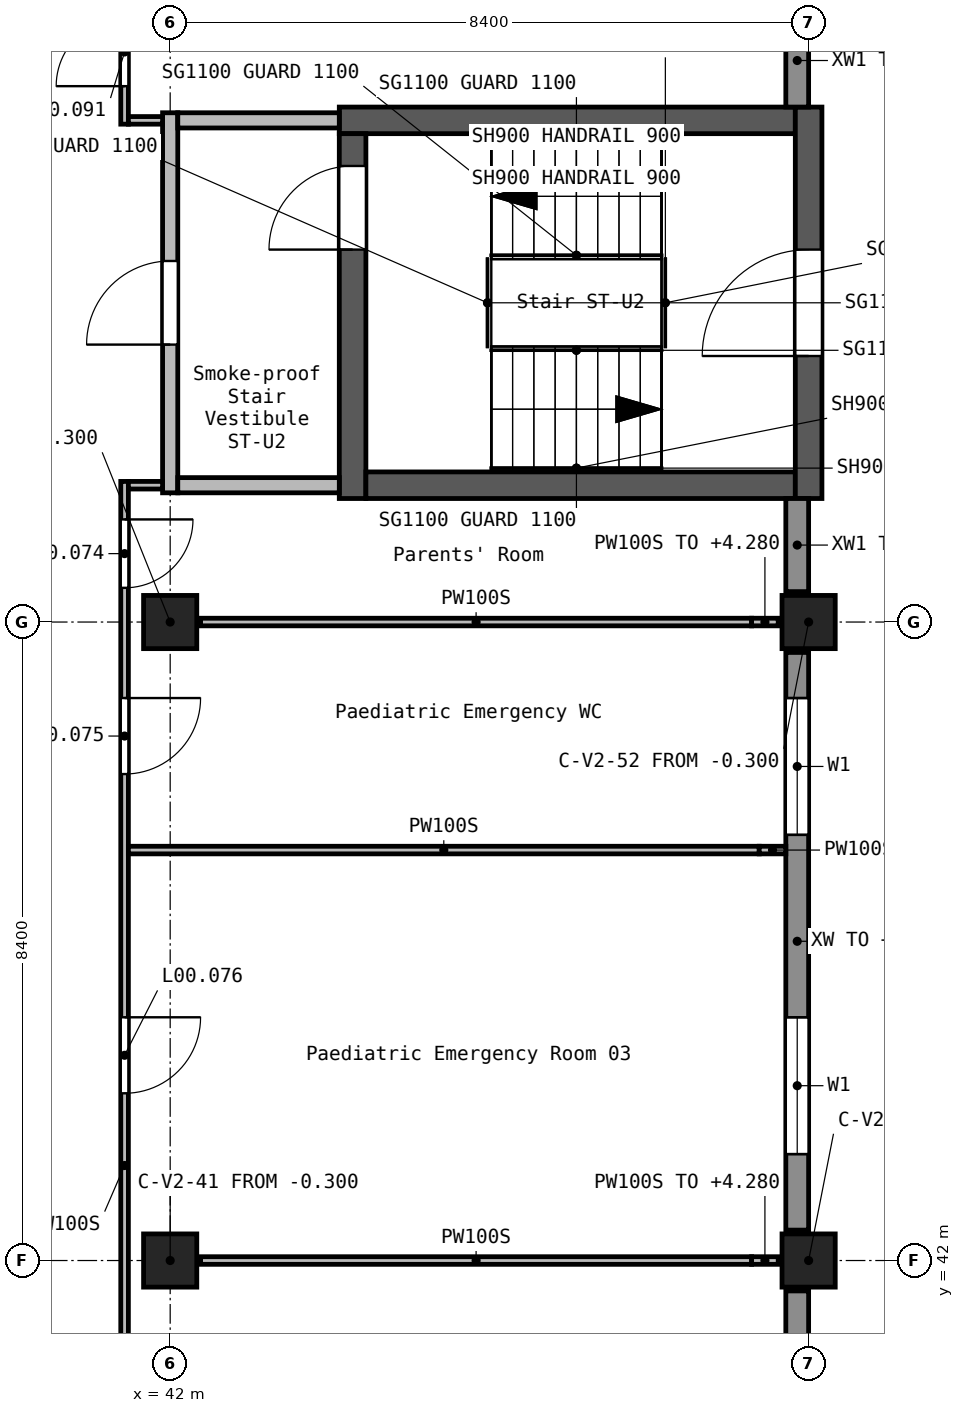
"""IFC4 building model, lengths in metres.
Left out: names, types, materials, properties, quantities, classifications, styles, units other than length and angle.
Written with IfcOpenShell. Run it as: python <this file> out.ifc"""

import sys

from ifc_helpers import new_model, si_unit, direction, frame, frame_2d, origin, origin_2d, place, context, subcontext, project, spatial, rectangle, extrude, element, fill, save


model = new_model("IFC4")
c1 = context("Model", 3, precision=1e-05, world=origin(), true_north=direction((0.0, 1.0)))
c2 = subcontext(c1, "Body", "Model", "MODEL_VIEW")
j1 = project(units=[si_unit("LENGTHUNIT", "METRE"), si_unit("PLANEANGLEUNIT", "RADIAN")], contexts=[c1])
p1 = place(None, origin())
s1 = spatial("IfcSite", under=j1, at=p1, CompositionType="ELEMENT")
p2 = place(p1, origin())
s2 = spatial("IfcBuilding", under=s1, at=p2, CompositionType="ELEMENT")
p3 = place(p2, origin())
s3 = spatial("IfcBuildingStorey", under=s2, at=p3, CompositionType="ELEMENT", Elevation=0.0)
for number, where, z_axis, x_axis in (
    (1, (42.0, 42.0, -0.3), (0.0, 0.0, 1.0), (1.0, 0.0, 0.0)),
    (2, (42.0, 50.4, -0.3), (0.0, 0.0, 1.0), (1.0, 0.0, 0.0)),
    (3, (50.4, 42.0, -0.3), (0.0, 0.0, 1.0), (1.0, 0.0, 0.0)),
    (4, (50.4, 50.4, -0.3), (0.0, 0.0, 1.0), (1.0, 0.0, 0.0)),
):
    element("IfcColumn", number, at=place(p3, frame(where, z_axis=z_axis, x_axis=x_axis)), inside=s3, PredefinedType="COLUMN", context=c2, shape_type="SweptSolid", body=[
        extrude(rectangle(XDim=0.7, YDim=0.7, at=origin_2d()), origin(), (0.0, 0.0, 1.0), 5.7),
    ])
p4 = place(p3, frame((44.225, 57.0, -0.3), z_axis=(0.0, 0.0, 1.0), x_axis=(1.0, 0.0, 0.0)))
e5 = element("IfcWall", 5, at=p4, inside=s3, PredefinedType="SHEAR", context=c2, shape_type="SweptSolid", body=[
    extrude(rectangle(XDim=6.0, YDim=0.35, at=frame_2d((3.0, 0.0))), origin(), (0.0, 0.0, 1.0), 5.7),
])
p5 = place(p3, frame((44.4, 52.025, -0.3), z_axis=(0.0, 0.0, 1.0), x_axis=(0.0, 1.0, 0.0)))
e6 = element("IfcWall", 6, at=p5, inside=s3, PredefinedType="SHEAR", context=c2, shape_type="SweptSolid", body=[
    extrude(rectangle(XDim=4.8, YDim=0.35, at=frame_2d((2.4, 0.0))), origin(), (0.0, 0.0, 1.0), 5.7),
])
p6 = place(p5, frame((3.275, 0.0, 0.3)))
e7 = element("IfcOpeningElement", 7, at=p6, cuts=e6, PredefinedType="OPENING", context=c2, shape_type="SweptSolid", body=[
    extrude(rectangle(XDim=1.1, YDim=2.1, at=frame_2d((0.55, 1.05))), frame((0.0, 0.185, 0.0), z_axis=(0.0, -1.0, 0.0), x_axis=(1.0, 0.0, 0.0)), (0.0, 0.0, 1.0), 0.37),
])
p7 = place(p3, frame((44.575, 52.2, -0.3), z_axis=(0.0, 0.0, 1.0), x_axis=(1.0, 0.0, 0.0)))
e8 = element("IfcWall", 8, at=p7, inside=s3, PredefinedType="SHEAR", context=c2, shape_type="SweptSolid", body=[
    extrude(rectangle(XDim=5.65, YDim=0.35, at=frame_2d((2.825, 0.0))), origin(), (0.0, 0.0, 1.0), 5.7),
])
p8 = place(p3, frame((50.4, 52.025, -0.3), z_axis=(0.0, 0.0, 1.0), x_axis=(0.0, 1.0, 0.0)))
e9 = element("IfcWall", 9, at=p8, inside=s3, PredefinedType="SHEAR", context=c2, shape_type="SweptSolid", body=[
    extrude(rectangle(XDim=5.15, YDim=0.35, at=frame_2d((2.575, 0.0))), origin(), (0.0, 0.0, 1.0), 5.7),
])
p9 = place(p8, frame((1.875, 0.0, 0.3)))
e10 = element("IfcOpeningElement", 10, at=p9, cuts=e9, PredefinedType="OPENING", context=c2, shape_type="SweptSolid", body=[
    extrude(rectangle(XDim=1.4, YDim=2.1, at=frame_2d((0.7, 1.05))), frame((0.0, 0.185, 0.0), z_axis=(0.0, -1.0, 0.0), x_axis=(1.0, 0.0, 0.0)), (0.0, 0.0, 1.0), 0.37),
])
p10 = place(p3, frame((50.25, 34.0, 0.0), z_axis=(0.0, 0.0, 1.0), x_axis=(0.0, 1.0, 0.0)))
e11 = element("IfcWall", 11, at=p10, inside=s3, PredefinedType="STANDARD", context=c2, shape_type="SweptSolid", body=[
    extrude(rectangle(XDim=7.6, YDim=0.3, at=frame_2d((3.8, 0.0))), origin(), (0.0, 0.0, 1.0), 4.25),
])
p11 = place(p10, frame((1.0, 0.0, 0.9)))
e12 = element("IfcOpeningElement", 12, at=p11, cuts=e11, PredefinedType="OPENING", context=c2, shape_type="SweptSolid", body=[
    extrude(rectangle(XDim=1.8, YDim=1.5, at=frame_2d((0.9, 0.75))), frame((0.0, 0.16, 0.0), z_axis=(0.0, -1.0, 0.0), x_axis=(1.0, 0.0, 0.0)), (0.0, 0.0, 1.0), 0.32),
])
p12 = place(p10, frame((4.8, 0.0, 0.9)))
e13 = element("IfcOpeningElement", 13, at=p12, cuts=e11, PredefinedType="OPENING", context=c2, shape_type="SweptSolid", body=[
    extrude(rectangle(XDim=1.8, YDim=1.5, at=frame_2d((0.9, 0.75))), frame((0.0, 0.16, 0.0), z_axis=(0.0, -1.0, 0.0), x_axis=(1.0, 0.0, 0.0)), (0.0, 0.0, 1.0), 0.32),
])
p13 = place(p3, frame((50.25, 42.4, 0.0), z_axis=(0.0, 0.0, 1.0), x_axis=(0.0, 1.0, 0.0)))
e14 = element("IfcWall", 14, at=p13, inside=s3, PredefinedType="STANDARD", context=c2, shape_type="SweptSolid", body=[
    extrude(rectangle(XDim=7.6, YDim=0.3, at=frame_2d((3.8, 0.0))), origin(), (0.0, 0.0, 1.0), 4.25),
])
p14 = place(p13, frame((1.0, 0.0, 0.9)))
e15 = element("IfcOpeningElement", 15, at=p14, cuts=e14, PredefinedType="OPENING", context=c2, shape_type="SweptSolid", body=[
    extrude(rectangle(XDim=1.8, YDim=1.5, at=frame_2d((0.9, 0.75))), frame((0.0, 0.16, 0.0), z_axis=(0.0, -1.0, 0.0), x_axis=(1.0, 0.0, 0.0)), (0.0, 0.0, 1.0), 0.32),
])
p15 = place(p13, frame((5.2, 0.0, 0.9)))
e16 = element("IfcOpeningElement", 16, at=p15, cuts=e14, PredefinedType="OPENING", context=c2, shape_type="SweptSolid", body=[
    extrude(rectangle(XDim=1.8, YDim=1.5, at=frame_2d((0.9, 0.75))), frame((0.0, 0.16, 0.0), z_axis=(0.0, -1.0, 0.0), x_axis=(1.0, 0.0, 0.0)), (0.0, 0.0, 1.0), 0.32),
])
for number, where, z_axis, x_axis in (
    (17, (50.25, 50.8, 0.0), (0.0, 0.0, 1.0), (0.0, 1.0, 0.0)),
    (18, (50.25, 57.175, 0.0), (0.0, 0.0, 1.0), (0.0, 1.0, 0.0)),
):
    element("IfcWall", number, at=place(p3, frame(where, z_axis=z_axis, x_axis=x_axis)), inside=s3, PredefinedType="STANDARD", context=c2, shape_type="SweptSolid", body=[
        extrude(rectangle(XDim=1.225, YDim=0.3, at=frame_2d((0.612, 0.0))), origin(), (0.0, 0.0, 1.0), 4.25),
    ])
p16 = place(p3, frame((42.0, 52.1, 0.0), z_axis=(0.0, 0.0, 1.0), x_axis=(0.0, 1.0, 0.0)))
e19 = element("IfcWall", 19, at=p16, inside=s3, PredefinedType="SOLIDWALL", context=c2, shape_type="SweptSolid", body=[
    extrude(rectangle(XDim=5.0, YDim=0.2, at=frame_2d((2.5, 0.0))), origin(), (0.0, 0.0, 1.0), 5.05),
])
p17 = place(p16, frame((1.95, 0.0, 0.0)))
e20 = element("IfcOpeningElement", 20, at=p17, cuts=e19, PredefinedType="OPENING", context=c2, shape_type="SweptSolid", body=[
    extrude(rectangle(XDim=1.1, YDim=2.1, at=frame_2d((0.55, 1.05))), frame((0.0, 0.11, 0.0), z_axis=(0.0, -1.0, 0.0), x_axis=(1.0, 0.0, 0.0)), (0.0, 0.0, 1.0), 0.22),
])
for number, where, z_axis, x_axis in (
    (21, (42.1, 52.2, 0.0), (0.0, 0.0, 1.0), (1.0, 0.0, 0.0)),
    (22, (42.1, 57.0, 0.0), (0.0, 0.0, 1.0), (1.0, 0.0, 0.0)),
):
    element("IfcWall", number, at=place(p3, frame(where, z_axis=z_axis, x_axis=x_axis)), inside=s3, PredefinedType="SOLIDWALL", context=c2, shape_type="SweptSolid", body=[
        extrude(rectangle(XDim=2.125, YDim=0.2, at=frame_2d((1.062, 0.0))), origin(), (0.0, 0.0, 1.0), 5.05),
    ])
p18 = place(p3, frame((41.4, 52.25, 0.0), z_axis=(0.0, 0.0, 1.0), x_axis=(0.0, -1.0, 0.0)))
e23 = element("IfcWall", 23, at=p18, inside=s3, PredefinedType="PARTITIONING", context=c2, shape_type="SweptSolid", body=[
    extrude(rectangle(XDim=18.0, YDim=0.1, at=frame_2d((9.0, 0.0))), origin(), (0.0, 0.0, 1.0), 5.05),
])
p19 = place(p18, frame((0.5, 0.0, 0.0)))
e24 = element("IfcOpeningElement", 24, at=p19, cuts=e23, PredefinedType="OPENING", context=c2, shape_type="SweptSolid", body=[
    extrude(rectangle(XDim=0.9, YDim=2.1, at=frame_2d((0.45, 1.05))), frame((0.0, 0.06, 0.0), z_axis=(0.0, -1.0, 0.0), x_axis=(1.0, 0.0, 0.0)), (0.0, 0.0, 1.0), 0.12),
])
p20 = place(p18, frame((2.85, 0.0, 0.0)))
e25 = element("IfcOpeningElement", 25, at=p20, cuts=e23, PredefinedType="OPENING", context=c2, shape_type="SweptSolid", body=[
    extrude(rectangle(XDim=1.0, YDim=2.1, at=frame_2d((0.5, 1.05))), frame((0.0, 0.06, 0.0), z_axis=(0.0, -1.0, 0.0), x_axis=(1.0, 0.0, 0.0)), (0.0, 0.0, 1.0), 0.12),
])
p21 = place(p18, frame((7.05, 0.0, 0.0)))
e26 = element("IfcOpeningElement", 26, at=p21, cuts=e23, PredefinedType="OPENING", context=c2, shape_type="SweptSolid", body=[
    extrude(rectangle(XDim=1.0, YDim=2.1, at=frame_2d((0.5, 1.05))), frame((0.0, 0.06, 0.0), z_axis=(0.0, -1.0, 0.0), x_axis=(1.0, 0.0, 0.0)), (0.0, 0.0, 1.0), 0.12),
])
p22 = place(p18, frame((13.55, 0.0, 0.0)))
e27 = element("IfcOpeningElement", 27, at=p22, cuts=e23, PredefinedType="OPENING", context=c2, shape_type="SweptSolid", body=[
    extrude(rectangle(XDim=1.8, YDim=2.1, at=frame_2d((0.9, 1.05))), frame((0.0, 0.06, 0.0), z_axis=(0.0, -1.0, 0.0), x_axis=(1.0, 0.0, 0.0)), (0.0, 0.0, 1.0), 0.12),
])
p23 = place(p3, frame((42.4, 42.0, 0.0), z_axis=(0.0, 0.0, 1.0), x_axis=(1.0, 0.0, 0.0)))
e28 = element("IfcWall", 28, at=p23, inside=s3, PredefinedType="PARTITIONING", context=c2, shape_type="SweptSolid", body=[
    extrude(rectangle(XDim=7.25, YDim=0.1, at=frame_2d((3.625, 0.0))), origin(), (0.0, 0.0, 1.0), 5.05),
])
p24 = place(p3, frame((49.65, 42.0, 0.0), z_axis=(0.0, 0.0, 1.0), x_axis=(1.0, 0.0, 0.0)))
e29 = element("IfcWall", 29, at=p24, inside=s3, PredefinedType="PARTITIONING", context=c2, shape_type="SweptSolid", body=[
    extrude(rectangle(XDim=0.35, YDim=0.1, at=frame_2d((0.175, 0.0))), origin(), (0.0, 0.0, 1.0), 4.28),
])
p25 = place(p3, frame((41.45, 47.4, 0.0), z_axis=(0.0, 0.0, 1.0), x_axis=(1.0, 0.0, 0.0)))
e30 = element("IfcWall", 30, at=p25, inside=s3, PredefinedType="PARTITIONING", context=c2, shape_type="SweptSolid", body=[
    extrude(rectangle(XDim=8.3, YDim=0.1, at=frame_2d((4.15, 0.0))), origin(), (0.0, 0.0, 1.0), 5.05),
])
p26 = place(p3, frame((49.75, 47.4, 0.0), z_axis=(0.0, 0.0, 1.0), x_axis=(1.0, 0.0, 0.0)))
e31 = element("IfcWall", 31, at=p26, inside=s3, PredefinedType="PARTITIONING", context=c2, shape_type="SweptSolid", body=[
    extrude(rectangle(XDim=0.35, YDim=0.1, at=frame_2d((0.175, 0.0))), origin(), (0.0, 0.0, 1.0), 4.28),
])
p27 = place(p3, frame((42.4, 50.4, 0.0), z_axis=(0.0, 0.0, 1.0), x_axis=(1.0, 0.0, 0.0)))
e32 = element("IfcWall", 32, at=p27, inside=s3, PredefinedType="PARTITIONING", context=c2, shape_type="SweptSolid", body=[
    extrude(rectangle(XDim=7.25, YDim=0.1, at=frame_2d((3.625, 0.0))), origin(), (0.0, 0.0, 1.0), 5.05),
])
p28 = place(p3, frame((49.65, 50.4, 0.0), z_axis=(0.0, 0.0, 1.0), x_axis=(1.0, 0.0, 0.0)))
e33 = element("IfcWall", 33, at=p28, inside=s3, PredefinedType="PARTITIONING", context=c2, shape_type="SweptSolid", body=[
    extrude(rectangle(XDim=0.35, YDim=0.1, at=frame_2d((0.175, 0.0))), origin(), (0.0, 0.0, 1.0), 4.28),
])
p29 = place(p3, frame((41.4, 56.95, 0.0), z_axis=(0.0, 0.0, 1.0), x_axis=(0.0, 1.0, 0.0)))
e34 = element("IfcWall", 34, at=p29, inside=s3, PredefinedType="PARTITIONING", context=c2, shape_type="SweptSolid", body=[
    extrude(rectangle(XDim=5.95, YDim=0.1, at=frame_2d((2.975, 0.0))), origin(), (0.0, 0.0, 1.0), 5.05),
])
p30 = place(p29, frame((0.5, 0.0, 0.0)))
e35 = element("IfcOpeningElement", 35, at=p30, cuts=e34, PredefinedType="OPENING", context=c2, shape_type="SweptSolid", body=[
    extrude(rectangle(XDim=0.9, YDim=2.1, at=frame_2d((0.45, 1.05))), frame((0.0, 0.06, 0.0), z_axis=(0.0, -1.0, 0.0), x_axis=(1.0, 0.0, 0.0)), (0.0, 0.0, 1.0), 0.12),
])
p31 = place(p29, frame((3.25, 0.0, 0.0)))
e36 = element("IfcOpeningElement", 36, at=p31, cuts=e34, PredefinedType="OPENING", context=c2, shape_type="SweptSolid", body=[
    extrude(rectangle(XDim=1.4, YDim=2.1, at=frame_2d((0.7, 1.05))), frame((0.0, 0.06, 0.0), z_axis=(0.0, -1.0, 0.0), x_axis=(1.0, 0.0, 0.0)), (0.0, 0.0, 1.0), 0.12),
])
for number, where, z_axis, x_axis in (
    (37, (41.45, 52.2, 0.0), (0.0, 0.0, 1.0), (1.0, 0.0, 0.0)),
    (38, (41.45, 57.0, 0.0), (0.0, 0.0, 1.0), (1.0, 0.0, 0.0)),
):
    element("IfcWall", number, at=place(p3, frame(where, z_axis=z_axis, x_axis=x_axis)), inside=s3, PredefinedType="PARTITIONING", context=c2, shape_type="SweptSolid", body=[
        extrude(rectangle(XDim=0.45, YDim=0.1, at=frame_2d((0.225, 0.0))), origin(), (0.0, 0.0, 1.0), 5.05),
    ])
p32 = place(p9, frame((1.4, 0.0, 0.0), z_axis=(0.0, 0.0, 1.0), x_axis=(-1.0, 0.0, 0.0)))
e39 = element("IfcDoor", 39, at=p32, inside=s3, OperationType="SINGLE_SWING_LEFT", PredefinedType="DOOR", context=c2, shape_type="SweptSolid", body=[
    extrude(rectangle(XDim=1.4, YDim=2.1, at=frame_2d((0.7, 1.05))), frame((0.0, 0.025, 0.0), z_axis=(0.0, -1.0, 0.0), x_axis=(1.0, 0.0, 0.0)), (0.0, 0.0, 1.0), 0.05),
])
fill(e10, e39)
p33 = place(p14, origin())
e40 = element("IfcWindow", 40, at=p33, inside=s3, PartitioningType="SINGLE_PANEL", PredefinedType="WINDOW", context=c2, shape_type="SweptSolid", body=[
    extrude(rectangle(XDim=1.8, YDim=1.5, at=frame_2d((0.9, 0.75))), frame((0.0, 0.03, 0.0), z_axis=(0.0, -1.0, 0.0), x_axis=(1.0, 0.0, 0.0)), (0.0, 0.0, 1.0), 0.06),
])
fill(e15, e40)
p34 = place(p15, origin())
e41 = element("IfcWindow", 41, at=p34, inside=s3, PartitioningType="SINGLE_PANEL", PredefinedType="WINDOW", context=c2, shape_type="SweptSolid", body=[
    extrude(rectangle(XDim=1.8, YDim=1.5, at=frame_2d((0.9, 0.75))), frame((0.0, 0.03, 0.0), z_axis=(0.0, -1.0, 0.0), x_axis=(1.0, 0.0, 0.0)), (0.0, 0.0, 1.0), 0.06),
])
fill(e16, e41)
p35 = place(p6, frame((1.1, 0.0, 0.0), z_axis=(0.0, 0.0, 1.0), x_axis=(-1.0, 0.0, 0.0)))
e42 = element("IfcDoor", 42, at=p35, inside=s3, OperationType="SINGLE_SWING_LEFT", PredefinedType="DOOR", context=c2, shape_type="SweptSolid", body=[
    extrude(rectangle(XDim=1.1, YDim=2.1, at=frame_2d((0.55, 1.05))), frame((0.0, 0.025, 0.0), z_axis=(0.0, -1.0, 0.0), x_axis=(1.0, 0.0, 0.0)), (0.0, 0.0, 1.0), 0.05),
])
fill(e7, e42)
p36 = place(p17, frame((1.1, 0.0, 0.0), z_axis=(0.0, 0.0, 1.0), x_axis=(-1.0, 0.0, 0.0)))
e43 = element("IfcDoor", 43, at=p36, inside=s3, OperationType="SINGLE_SWING_RIGHT", PredefinedType="DOOR", context=c2, shape_type="SweptSolid", body=[
    extrude(rectangle(XDim=1.1, YDim=2.1, at=frame_2d((0.55, 1.05))), frame((0.0, 0.025, 0.0), z_axis=(0.0, -1.0, 0.0), x_axis=(1.0, 0.0, 0.0)), (0.0, 0.0, 1.0), 0.05),
])
fill(e20, e43)
p37 = place(p19, origin())
e44 = element("IfcDoor", 44, at=p37, inside=s3, OperationType="SINGLE_SWING_LEFT", PredefinedType="DOOR", context=c2, shape_type="SweptSolid", body=[
    extrude(rectangle(XDim=0.9, YDim=2.1, at=frame_2d((0.45, 1.05))), frame((0.0, 0.025, 0.0), z_axis=(0.0, -1.0, 0.0), x_axis=(1.0, 0.0, 0.0)), (0.0, 0.0, 1.0), 0.05),
])
fill(e24, e44)
p38 = place(p20, origin())
e45 = element("IfcDoor", 45, at=p38, inside=s3, OperationType="SINGLE_SWING_LEFT", PredefinedType="DOOR", context=c2, shape_type="SweptSolid", body=[
    extrude(rectangle(XDim=1.0, YDim=2.1, at=frame_2d((0.5, 1.05))), frame((0.0, 0.025, 0.0), z_axis=(0.0, -1.0, 0.0), x_axis=(1.0, 0.0, 0.0)), (0.0, 0.0, 1.0), 0.05),
])
fill(e25, e45)
p39 = place(p21, origin())
e46 = element("IfcDoor", 46, at=p39, inside=s3, OperationType="SINGLE_SWING_LEFT", PredefinedType="DOOR", context=c2, shape_type="SweptSolid", body=[
    extrude(rectangle(XDim=1.0, YDim=2.1, at=frame_2d((0.5, 1.05))), frame((0.0, 0.025, 0.0), z_axis=(0.0, -1.0, 0.0), x_axis=(1.0, 0.0, 0.0)), (0.0, 0.0, 1.0), 0.05),
])
fill(e26, e46)
p40 = place(p30, frame((0.9, 0.0, 0.0), z_axis=(0.0, 0.0, 1.0), x_axis=(-1.0, 0.0, 0.0)))
e47 = element("IfcDoor", 47, at=p40, inside=s3, OperationType="SINGLE_SWING_RIGHT", PredefinedType="DOOR", context=c2, shape_type="SweptSolid", body=[
    extrude(rectangle(XDim=0.9, YDim=2.1, at=frame_2d((0.45, 1.05))), frame((0.0, 0.025, 0.0), z_axis=(0.0, -1.0, 0.0), x_axis=(1.0, 0.0, 0.0)), (0.0, 0.0, 1.0), 0.05),
])
fill(e35, e47)
save(model, sys.argv[1])
